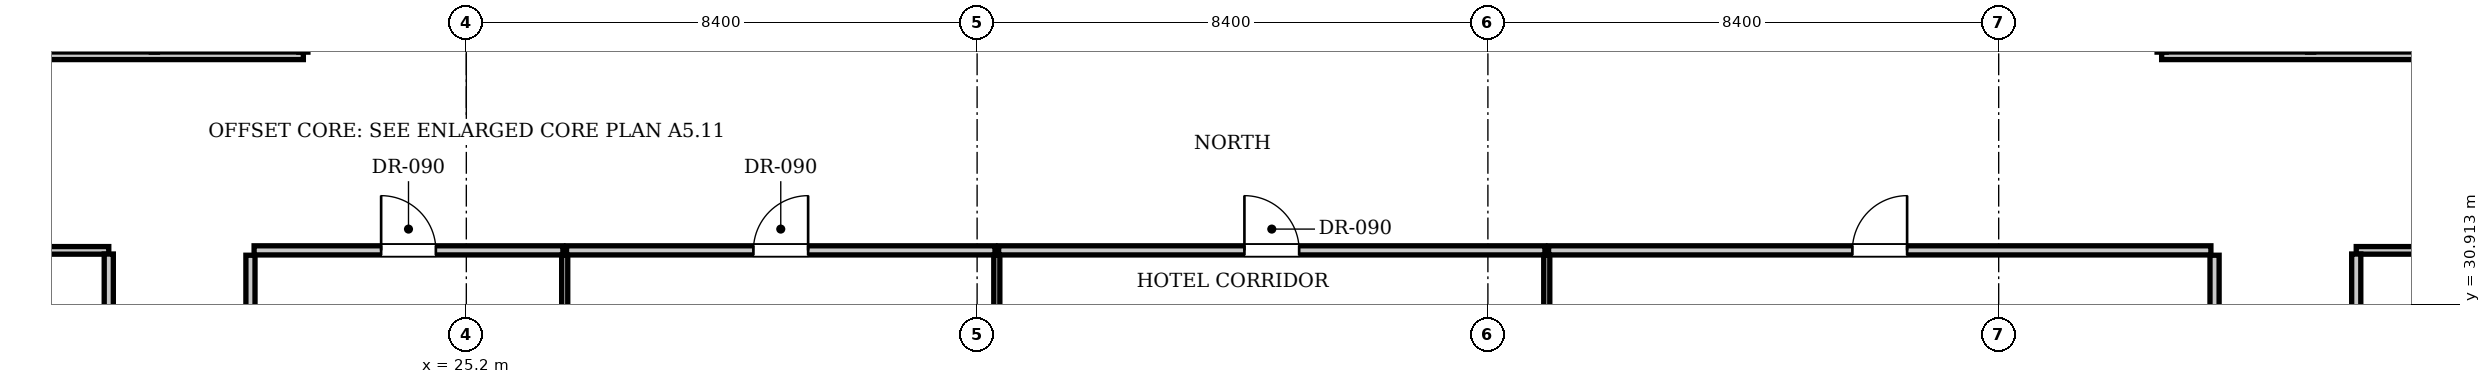
"""IFC4 building model, lengths in metres.
Left out: names, types, materials, properties, quantities, classifications, styles, units other than length and angle.
Written with IfcOpenShell. Run it as: python <this file> out.ifc"""

import sys

from ifc_helpers import new_model, si_unit, direction, frame, frame_2d, origin, place, context, subcontext, project, spatial, rectangle, extrude, element, fill, save


model = new_model("IFC4")
c1 = context("Model", 3, precision=1e-05, world=origin(), true_north=direction((0.0, 1.0)))
c2 = subcontext(c1, "Body", "Model", "MODEL_VIEW")
j1 = project(units=[si_unit("LENGTHUNIT", "METRE"), si_unit("PLANEANGLEUNIT", "RADIAN")], contexts=[c1])
p1 = place(None, origin())
s1 = spatial("IfcSite", under=j1, at=p1, CompositionType="ELEMENT")
p2 = place(p1, origin())
s2 = spatial("IfcBuilding", under=s1, at=p2, CompositionType="ELEMENT")
p3 = place(p2, frame((0.0, 0.0, 38.5)))
s3 = spatial("IfcBuildingStorey", under=s2, at=p3, CompositionType="ELEMENT", Elevation=38.5)
for number, where, z_axis, x_axis in (
    (1, (21.65, 23.48, 0.0), (0.0, 0.0, 1.0), (0.0, 1.0, 0.0)),
    (2, (53.95, 23.48, 0.0), (0.0, 0.0, 1.0), (0.0, 1.0, 0.0)),
):
    element("IfcWall", number, at=place(p3, frame(where, z_axis=z_axis, x_axis=x_axis)), inside=s3, PredefinedType="PARTITIONING", context=c2, shape_type="SweptSolid", body=[
        extrude(rectangle(XDim=8.24, YDim=0.15, at=frame_2d((4.12, 0.0))), origin(), (0.0, 0.0, 1.0), 3.61),
    ])
p4 = place(p3, frame((21.71, 31.8, 0.0), z_axis=(0.0, 0.0, 1.0), x_axis=(1.0, 0.0, 0.0)))
e3 = element("IfcWall", 3, at=p4, inside=s3, PredefinedType="PARTITIONING", context=c2, shape_type="SweptSolid", body=[
    extrude(rectangle(XDim=5.078, YDim=0.15, at=frame_2d((2.539, 0.0))), origin(), (0.0, 0.0, 1.0), 3.61),
])
p5 = place(p4, frame((2.089, 0.0, 0.0)))
e4 = element("IfcOpeningElement", 4, at=p5, cuts=e3, PredefinedType="OPENING", context=c2, shape_type="SweptSolid", body=[
    extrude(rectangle(XDim=0.9, YDim=2.1, at=frame_2d((0.45, 1.05))), frame((0.0, 0.085, 0.0), z_axis=(0.0, -1.0, 0.0), x_axis=(1.0, 0.0, 0.0)), (0.0, 0.0, 1.0), 0.17),
])
p6 = place(p3, frame((26.818, 23.48, 0.0), z_axis=(0.0, 0.0, 1.0), x_axis=(0.0, 1.0, 0.0)))
e5 = element("IfcWall", 5, at=p6, inside=s3, PredefinedType="PARTITIONING", context=c2, shape_type="SweptSolid", body=[
    extrude(rectangle(XDim=8.24, YDim=0.1, at=frame_2d((4.12, 0.0))), origin(), (0.0, 0.0, 1.0), 3.61),
])
p7 = place(p3, frame((26.848, 31.8, 0.0), z_axis=(0.0, 0.0, 1.0), x_axis=(1.0, 0.0, 0.0)))
e6 = element("IfcWall", 6, at=p7, inside=s3, PredefinedType="PARTITIONING", context=c2, shape_type="SweptSolid", body=[
    extrude(rectangle(XDim=7.046, YDim=0.15, at=frame_2d((3.523, 0.0))), origin(), (0.0, 0.0, 1.0), 3.61),
])
p8 = place(p7, frame((3.073, 0.0, 0.0)))
e7 = element("IfcOpeningElement", 7, at=p8, cuts=e6, PredefinedType="OPENING", context=c2, shape_type="SweptSolid", body=[
    extrude(rectangle(XDim=0.9, YDim=2.1, at=frame_2d((0.45, 1.05))), frame((0.0, 0.085, 0.0), z_axis=(0.0, -1.0, 0.0), x_axis=(1.0, 0.0, 0.0)), (0.0, 0.0, 1.0), 0.17),
])
p9 = place(p3, frame((33.924, 23.48, 0.0), z_axis=(0.0, 0.0, 1.0), x_axis=(0.0, 1.0, 0.0)))
e8 = element("IfcWall", 8, at=p9, inside=s3, PredefinedType="PARTITIONING", context=c2, shape_type="SweptSolid", body=[
    extrude(rectangle(XDim=8.24, YDim=0.1, at=frame_2d((4.12, 0.0))), origin(), (0.0, 0.0, 1.0), 3.61),
])
p10 = place(p3, frame((33.954, 31.8, 0.0), z_axis=(0.0, 0.0, 1.0), x_axis=(1.0, 0.0, 0.0)))
e9 = element("IfcWall", 9, at=p10, inside=s3, PredefinedType="PARTITIONING", context=c2, shape_type="SweptSolid", body=[
    extrude(rectangle(XDim=8.984, YDim=0.15, at=frame_2d((4.492, 0.0))), origin(), (0.0, 0.0, 1.0), 3.61),
])
p11 = place(p10, frame((4.042, 0.0, 0.0)))
e10 = element("IfcOpeningElement", 10, at=p11, cuts=e9, PredefinedType="OPENING", context=c2, shape_type="SweptSolid", body=[
    extrude(rectangle(XDim=0.9, YDim=2.1, at=frame_2d((0.45, 1.05))), frame((0.0, 0.085, 0.0), z_axis=(0.0, -1.0, 0.0), x_axis=(1.0, 0.0, 0.0)), (0.0, 0.0, 1.0), 0.17),
])
p12 = place(p3, frame((42.968, 23.48, 0.0), z_axis=(0.0, 0.0, 1.0), x_axis=(0.0, 1.0, 0.0)))
e11 = element("IfcWall", 11, at=p12, inside=s3, PredefinedType="PARTITIONING", context=c2, shape_type="SweptSolid", body=[
    extrude(rectangle(XDim=8.24, YDim=0.1, at=frame_2d((4.12, 0.0))), origin(), (0.0, 0.0, 1.0), 3.61),
])
p13 = place(p3, frame((42.998, 31.8, 0.0), z_axis=(0.0, 0.0, 1.0), x_axis=(1.0, 0.0, 0.0)))
e12 = element("IfcWall", 12, at=p13, inside=s3, PredefinedType="PARTITIONING", context=c2, shape_type="SweptSolid", body=[
    extrude(rectangle(XDim=10.892, YDim=0.15, at=frame_2d((5.446, 0.0))), origin(), (0.0, 0.0, 1.0), 3.61),
])
p14 = place(p13, frame((4.996, 0.0, 0.0)))
e13 = element("IfcOpeningElement", 13, at=p14, cuts=e12, PredefinedType="OPENING", context=c2, shape_type="SweptSolid", body=[
    extrude(rectangle(XDim=0.9, YDim=2.1, at=frame_2d((0.45, 1.05))), frame((0.0, 0.085, 0.0), z_axis=(0.0, -1.0, 0.0), x_axis=(1.0, 0.0, 0.0)), (0.0, 0.0, 1.0), 0.17),
])
p15 = place(p3, frame((10.9, 31.8, 0.0), z_axis=(0.0, 0.0, 1.0), x_axis=(1.0, 0.0, 0.0)))
e14 = element("IfcWall", 14, at=p15, inside=s3, PredefinedType="PARTITIONING", context=c2, shape_type="SweptSolid", body=[
    extrude(rectangle(XDim=8.42, YDim=0.125, at=frame_2d((4.21, 0.0))), origin(), (0.0, 0.0, 1.0), 3.61),
])
p16 = place(p3, frame((56.28, 31.8, 0.0), z_axis=(0.0, 0.0, 1.0), x_axis=(1.0, 0.0, 0.0)))
e15 = element("IfcWall", 15, at=p16, inside=s3, PredefinedType="PARTITIONING", context=c2, shape_type="SweptSolid", body=[
    extrude(rectangle(XDim=8.42, YDim=0.125, at=frame_2d((4.21, 0.0))), origin(), (0.0, 0.0, 1.0), 3.61),
])
for number, where, z_axis, x_axis in (
    (16, (19.32, 29.85, 0.0), (0.0, 0.0, 1.0), (0.0, 1.0, 0.0)),
    (17, (56.28, 29.85, 0.0), (0.0, 0.0, 1.0), (0.0, 1.0, 0.0)),
):
    element("IfcWall", number, at=place(p3, frame(where, z_axis=z_axis, x_axis=x_axis)), inside=s3, PredefinedType="PARTITIONING", context=c2, shape_type="SweptSolid", body=[
        extrude(rectangle(XDim=1.89, YDim=0.15, at=frame_2d((0.945, 0.0))), origin(), (0.0, 0.0, 1.0), 3.61),
    ])
p17 = place(p3, frame((10.9, 35.0, 0.0), z_axis=(0.0, 0.0, 1.0), x_axis=(1.0, 0.0, 0.0)))
e18 = element("IfcWall", 18, at=p17, inside=s3, PredefinedType="PARTITIONING", context=c2, shape_type="SweptSolid", body=[
    extrude(rectangle(XDim=11.62, YDim=0.125, at=frame_2d((5.81, 0.0))), origin(), (0.0, 0.0, 1.0), 3.61),
])
p18 = place(p3, frame((53.08, 35.0, 0.0), z_axis=(0.0, 0.0, 1.0), x_axis=(1.0, 0.0, 0.0)))
e19 = element("IfcWall", 19, at=p18, inside=s3, PredefinedType="PARTITIONING", context=c2, shape_type="SweptSolid", body=[
    extrude(rectangle(XDim=11.62, YDim=0.125, at=frame_2d((5.81, 0.0))), origin(), (0.0, 0.0, 1.0), 3.61),
])
p19 = place(p5, origin())
e20 = element("IfcDoor", 20, at=p19, inside=s3, OperationType="SINGLE_SWING_LEFT", PredefinedType="DOOR", context=c2, shape_type="SweptSolid", body=[
    extrude(rectangle(XDim=0.9, YDim=2.1, at=frame_2d((0.45, 1.05))), frame((0.0, 0.025, 0.0), z_axis=(0.0, -1.0, 0.0), x_axis=(1.0, 0.0, 0.0)), (0.0, 0.0, 1.0), 0.05),
])
fill(e4, e20)
p20 = place(p8, origin())
e21 = element("IfcDoor", 21, at=p20, inside=s3, OperationType="SINGLE_SWING_RIGHT", PredefinedType="DOOR", context=c2, shape_type="SweptSolid", body=[
    extrude(rectangle(XDim=0.9, YDim=2.1, at=frame_2d((0.45, 1.05))), frame((0.0, 0.025, 0.0), z_axis=(0.0, -1.0, 0.0), x_axis=(1.0, 0.0, 0.0)), (0.0, 0.0, 1.0), 0.05),
])
fill(e7, e21)
p21 = place(p11, origin())
e22 = element("IfcDoor", 22, at=p21, inside=s3, OperationType="SINGLE_SWING_LEFT", PredefinedType="DOOR", context=c2, shape_type="SweptSolid", body=[
    extrude(rectangle(XDim=0.9, YDim=2.1, at=frame_2d((0.45, 1.05))), frame((0.0, 0.025, 0.0), z_axis=(0.0, -1.0, 0.0), x_axis=(1.0, 0.0, 0.0)), (0.0, 0.0, 1.0), 0.05),
])
fill(e10, e22)
p22 = place(p14, origin())
e23 = element("IfcDoor", 23, at=p22, inside=s3, OperationType="SINGLE_SWING_RIGHT", PredefinedType="DOOR", context=c2, shape_type="SweptSolid", body=[
    extrude(rectangle(XDim=0.9, YDim=2.1, at=frame_2d((0.45, 1.05))), frame((0.0, 0.025, 0.0), z_axis=(0.0, -1.0, 0.0), x_axis=(1.0, 0.0, 0.0)), (0.0, 0.0, 1.0), 0.05),
])
fill(e13, e23)
save(model, sys.argv[1])
